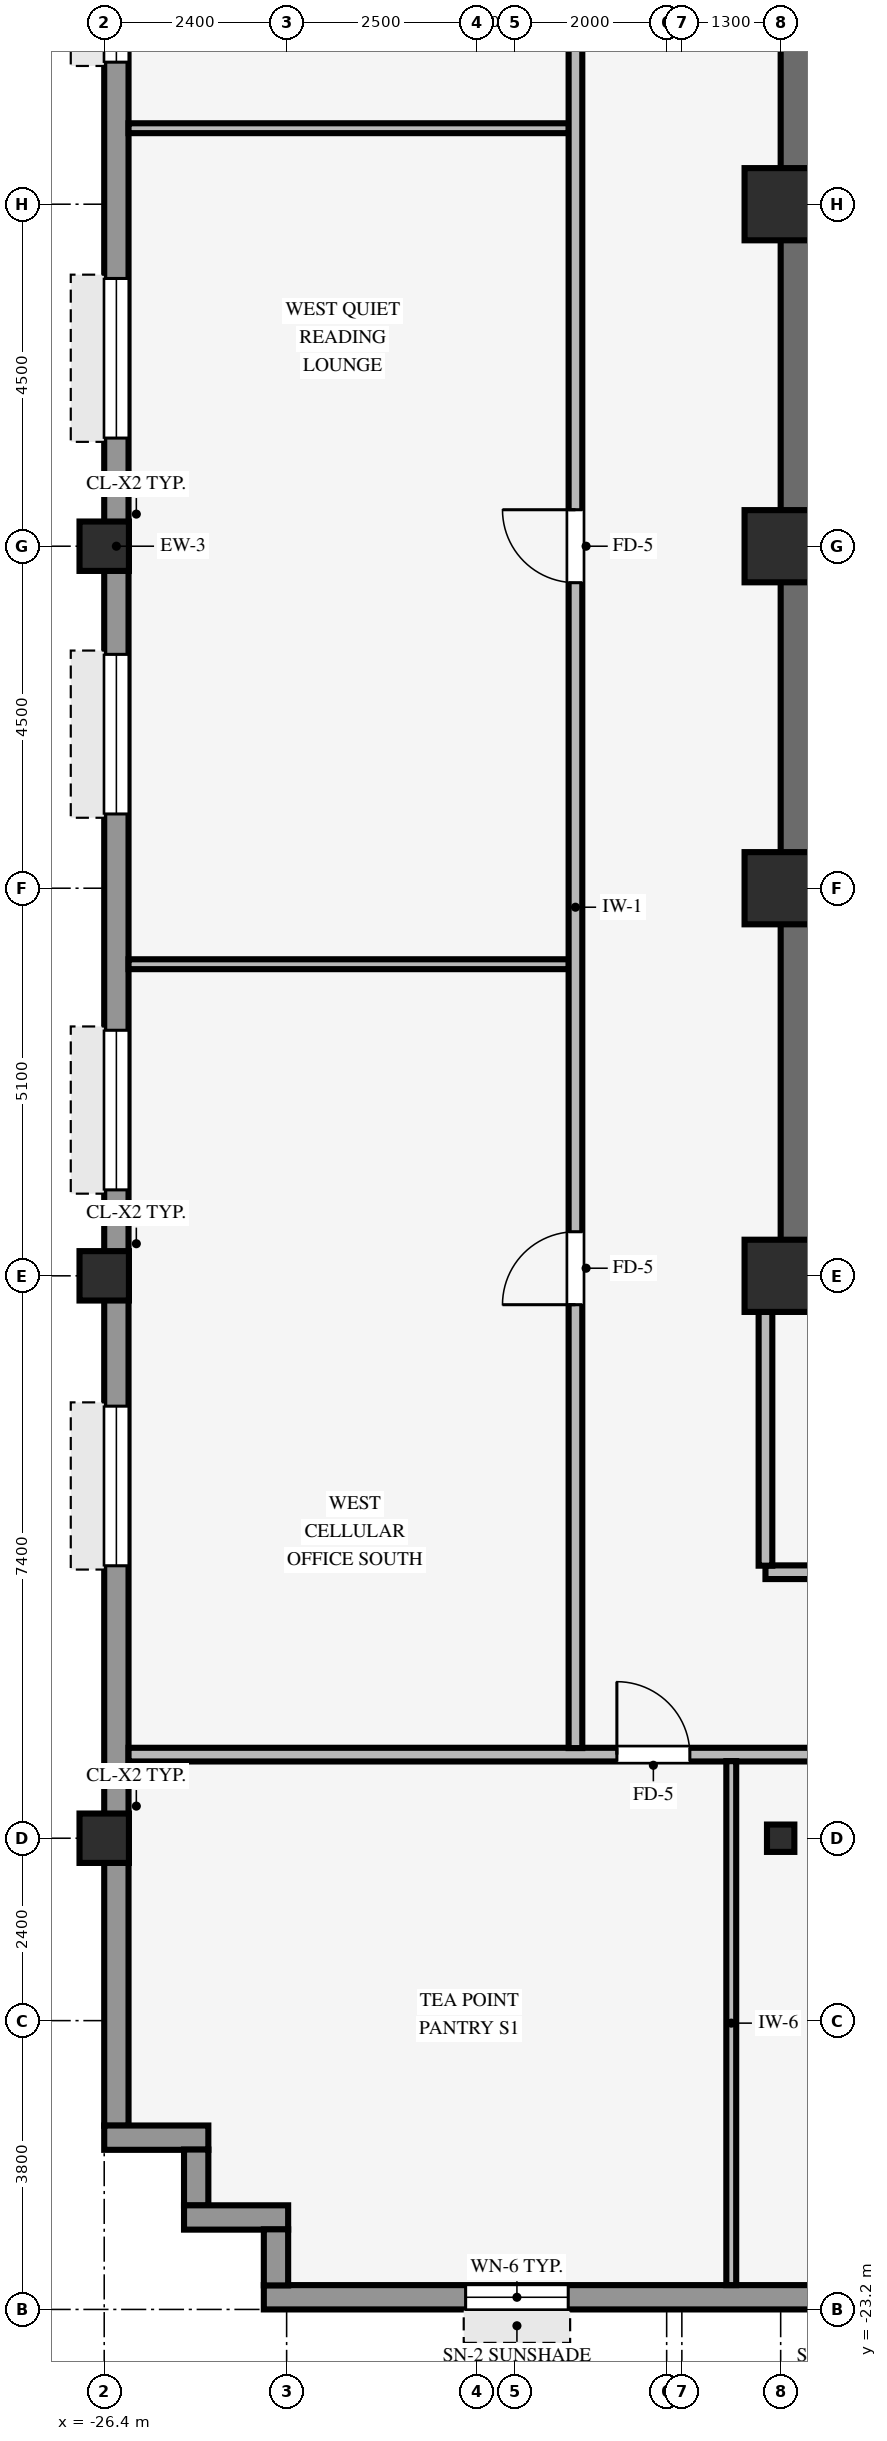
"""IFC4 building model, lengths in metres.
Left out: names, types, materials, properties, quantities, classifications, styles, units other than length and angle.
Written with IfcOpenShell. Run it as: python <this file> out.ifc"""

import sys

from ifc_helpers import new_model, si_unit, direction, frame, frame_2d, origin, origin_2d, place, context, subcontext, project, spatial, rectangle, hollow_rectangle, i_section, extrude, source, transform, mapped, element, fill, save


model = new_model("IFC4")
c1 = context("Model", 3, precision=1e-05, world=origin(), true_north=direction((0.0, 1.0)))
c2 = subcontext(c1, "Body", "Model", "MODEL_VIEW")
j1 = project(units=[si_unit("LENGTHUNIT", "METRE"), si_unit("PLANEANGLEUNIT", "RADIAN")], contexts=[c1])
p1 = place(None, origin())
s1 = spatial("IfcSite", under=j1, at=p1, CompositionType="ELEMENT")
p2 = place(p1, origin())
s2 = spatial("IfcBuilding", under=s1, at=p2, CompositionType="ELEMENT")
p3 = place(p2, frame((0.0, 0.0, 153.05)))
s3 = spatial("IfcBuildingStorey", under=s2, at=p3, CompositionType="ELEMENT", Elevation=153.05)
p4 = place(p3, frame((-17.5, -9.4, 0.0), z_axis=(0.0, 0.0, 1.0), x_axis=(1.0, 0.0, 0.0)))
e1 = element("IfcWall", 1, at=p4, inside=s3, PredefinedType="SHEAR", context=c2, shape_type="SweptSolid", body=[
    extrude(rectangle(XDim=8.5, YDim=0.4, at=frame_2d((4.25, 0.0))), origin(), (0.0, 0.0, 1.0), 3.37),
])
p5 = place(p3, frame((-17.3, -9.205, 0.0), z_axis=(0.0, 0.0, 1.0), x_axis=(0.0, 1.0, 0.0)))
e2 = element("IfcWall", 2, at=p5, inside=s3, PredefinedType="SHEAR", context=c2, shape_type="SweptSolid", body=[
    extrude(rectangle(XDim=18.41, YDim=0.4, at=frame_2d((9.205, 0.0))), origin(), (0.0, 0.0, 1.0), 3.37),
])
for number, where, z_axis, x_axis in (
    (3, (-17.5, -9.6, 0.0), (0.0, 0.0, 1.0), (1.0, 0.0, 0.0)),
    (4, (-17.5, -4.5, 0.0), (0.0, 0.0, 1.0), (1.0, 0.0, 0.0)),
    (5, (-17.5, 4.5, 0.0), (0.0, 0.0, 1.0), (1.0, 0.0, 0.0)),
    (6, (-17.5, 0.0, 0.0), (0.0, 0.0, 1.0), (1.0, 0.0, 0.0)),
):
    element("IfcColumn", number, at=place(p3, frame(where, z_axis=z_axis, x_axis=x_axis)), inside=s3, PredefinedType="COLUMN", context=c2, shape_type="SweptSolid", body=[
        extrude(rectangle(XDim=0.95, YDim=0.95, at=origin_2d()), origin(), (0.0, 0.0, 1.0), 3.37),
    ])
for number, where, z_axis, x_axis in (
    (7, (-26.4, -17.0, 0.0), (0.0, 0.0, 1.0), (1.0, 0.0, 0.0)),
    (8, (-26.4, -9.6, 0.0), (0.0, 0.0, 1.0), (1.0, 0.0, 0.0)),
    (9, (-26.4, 0.0, 0.0), (0.0, 0.0, 1.0), (1.0, 0.0, 0.0)),
):
    element("IfcColumn", number, at=place(p3, frame(where, z_axis=z_axis, x_axis=x_axis)), inside=s3, PredefinedType="COLUMN", context=c2, shape_type="SweptSolid", body=[
        extrude(hollow_rectangle(XDim=0.65, YDim=0.65, WallThickness=0.04, InnerFilletRadius=0.04, OuterFilletRadius=0.08, at=origin_2d()), origin(), (0.0, 0.0, 1.0), 3.37),
    ])
p6 = place(p3, frame((-17.5, -17.0, 0.0), z_axis=(0.0, 0.0, 1.0), x_axis=(1.0, 0.0, 0.0)))
e10 = element("IfcColumn", 10, at=p6, inside=s3, PredefinedType="COLUMN", context=c2, shape_type="SweptSolid", body=[
    extrude(i_section(OverallWidth=0.36, OverallDepth=0.36, WebThickness=0.021, FlangeThickness=0.021, FilletRadius=0.018, at=origin_2d()), origin(), (0.0, 0.0, 1.0), 3.37),
])
p7 = place(p3, frame((-24.3, -23.04, 0.0), z_axis=(0.0, 0.0, 1.0), x_axis=(1.0, 0.0, 0.0)))
e11 = element("IfcWall", 11, at=p7, inside=s3, PredefinedType="STANDARD", context=c2, shape_type="SweptSolid", body=[
    extrude(rectangle(XDim=48.6, YDim=0.32, at=frame_2d((24.3, 0.0))), origin(), (0.0, 0.0, 1.0), 2.705),
])
p8 = place(p7, frame((19.95, 0.0, 0.0), z_axis=(0.0, 0.0, 1.0), x_axis=(-1.0, 0.0, 0.0)))
e12 = element("IfcOpeningElement", 12, at=p8, cuts=e11, PredefinedType="OPENING", context=c2, shape_type="SweptSolid", body=[
    extrude(rectangle(XDim=1.05, YDim=2.1, at=frame_2d((0.525, 1.05))), frame((0.0, 0.17, 0.0), z_axis=(0.0, -1.0, 0.0), x_axis=(1.0, 0.0, 0.0)), (0.0, 0.0, 1.0), 0.34),
])
p9 = place(p7, frame((2.655, 0.0, 0.8)))
e13 = element("IfcOpeningElement", 13, at=p9, cuts=e11, PredefinedType="OPENING", context=c2, shape_type="SweptSolid", body=[
    extrude(rectangle(XDim=1.35, YDim=1.56, at=frame_2d((0.675, 0.78))), frame((0.0, 0.17, 0.0), z_axis=(0.0, -1.0, 0.0), x_axis=(1.0, 0.0, 0.0)), (0.0, 0.0, 1.0), 0.34),
])
p10 = place(p7, frame((7.315, 0.0, 0.8)))
e14 = element("IfcOpeningElement", 14, at=p10, cuts=e11, PredefinedType="OPENING", context=c2, shape_type="SweptSolid", body=[
    extrude(rectangle(XDim=1.35, YDim=1.56, at=frame_2d((0.675, 0.78))), frame((0.0, 0.17, 0.0), z_axis=(0.0, -1.0, 0.0), x_axis=(1.0, 0.0, 0.0)), (0.0, 0.0, 1.0), 0.34),
])
p11 = place(p7, frame((11.975, 0.0, 0.8)))
e15 = element("IfcOpeningElement", 15, at=p11, cuts=e11, PredefinedType="OPENING", context=c2, shape_type="SweptSolid", body=[
    extrude(rectangle(XDim=1.35, YDim=1.56, at=frame_2d((0.675, 0.78))), frame((0.0, 0.17, 0.0), z_axis=(0.0, -1.0, 0.0), x_axis=(1.0, 0.0, 0.0)), (0.0, 0.0, 1.0), 0.34),
])
p12 = place(p7, frame((21.295, 0.0, 0.8)))
e16 = element("IfcOpeningElement", 16, at=p12, cuts=e11, PredefinedType="OPENING", context=c2, shape_type="SweptSolid", body=[
    extrude(rectangle(XDim=1.35, YDim=1.56, at=frame_2d((0.675, 0.78))), frame((0.0, 0.17, 0.0), z_axis=(0.0, -1.0, 0.0), x_axis=(1.0, 0.0, 0.0)), (0.0, 0.0, 1.0), 0.34),
])
p13 = place(p7, frame((25.955, 0.0, 0.8)))
e17 = element("IfcOpeningElement", 17, at=p13, cuts=e11, PredefinedType="OPENING", context=c2, shape_type="SweptSolid", body=[
    extrude(rectangle(XDim=1.35, YDim=1.56, at=frame_2d((0.675, 0.78))), frame((0.0, 0.17, 0.0), z_axis=(0.0, -1.0, 0.0), x_axis=(1.0, 0.0, 0.0)), (0.0, 0.0, 1.0), 0.34),
])
p14 = place(p7, frame((31.065, 0.0, 0.8)))
e18 = element("IfcOpeningElement", 18, at=p14, cuts=e11, PredefinedType="OPENING", context=c2, shape_type="SweptSolid", body=[
    extrude(rectangle(XDim=1.35, YDim=1.56, at=frame_2d((0.675, 0.78))), frame((0.0, 0.17, 0.0), z_axis=(0.0, -1.0, 0.0), x_axis=(1.0, 0.0, 0.0)), (0.0, 0.0, 1.0), 0.34),
])
p15 = place(p7, frame((35.275, 0.0, 0.8)))
e19 = element("IfcOpeningElement", 19, at=p15, cuts=e11, PredefinedType="OPENING", context=c2, shape_type="SweptSolid", body=[
    extrude(rectangle(XDim=1.35, YDim=1.56, at=frame_2d((0.675, 0.78))), frame((0.0, 0.17, 0.0), z_axis=(0.0, -1.0, 0.0), x_axis=(1.0, 0.0, 0.0)), (0.0, 0.0, 1.0), 0.34),
])
p16 = place(p7, frame((39.935, 0.0, 0.8)))
e20 = element("IfcOpeningElement", 20, at=p16, cuts=e11, PredefinedType="OPENING", context=c2, shape_type="SweptSolid", body=[
    extrude(rectangle(XDim=1.35, YDim=1.56, at=frame_2d((0.675, 0.78))), frame((0.0, 0.17, 0.0), z_axis=(0.0, -1.0, 0.0), x_axis=(1.0, 0.0, 0.0)), (0.0, 0.0, 1.0), 0.34),
])
p17 = place(p7, frame((44.595, 0.0, 0.8)))
e21 = element("IfcOpeningElement", 21, at=p17, cuts=e11, PredefinedType="OPENING", context=c2, shape_type="SweptSolid", body=[
    extrude(rectangle(XDim=1.35, YDim=1.56, at=frame_2d((0.675, 0.78))), frame((0.0, 0.17, 0.0), z_axis=(0.0, -1.0, 0.0), x_axis=(1.0, 0.0, 0.0)), (0.0, 0.0, 1.0), 0.34),
])
p18 = place(p3, frame((-26.24, -20.784, 0.0), z_axis=(0.0, 0.0, 1.0), x_axis=(0.0, 1.0, 0.0)))
e22 = element("IfcWall", 22, at=p18, inside=s3, PredefinedType="STANDARD", context=c2, shape_type="SweptSolid", body=[
    extrude(rectangle(XDim=41.568, YDim=0.32, at=frame_2d((20.784, 0.0))), origin(), (0.0, 0.0, 1.0), 2.705),
])
p19 = place(p18, frame((7.369, 0.0, 0.8)))
e23 = element("IfcOpeningElement", 23, at=p19, cuts=e22, PredefinedType="OPENING", context=c2, shape_type="SweptSolid", body=[
    extrude(rectangle(XDim=2.1, YDim=1.56, at=frame_2d((1.05, 0.78))), frame((0.0, 0.17, 0.0), z_axis=(0.0, -1.0, 0.0), x_axis=(1.0, 0.0, 0.0)), (0.0, 0.0, 1.0), 0.34),
])
p20 = place(p18, frame((12.315, 0.0, 0.8)))
e24 = element("IfcOpeningElement", 24, at=p20, cuts=e22, PredefinedType="OPENING", context=c2, shape_type="SweptSolid", body=[
    extrude(rectangle(XDim=2.1, YDim=1.56, at=frame_2d((1.05, 0.78))), frame((0.0, 0.17, 0.0), z_axis=(0.0, -1.0, 0.0), x_axis=(1.0, 0.0, 0.0)), (0.0, 0.0, 1.0), 0.34),
])
p21 = place(p18, frame((17.261, 0.0, 0.8)))
e25 = element("IfcOpeningElement", 25, at=p21, cuts=e22, PredefinedType="OPENING", context=c2, shape_type="SweptSolid", body=[
    extrude(rectangle(XDim=2.1, YDim=1.56, at=frame_2d((1.05, 0.78))), frame((0.0, 0.17, 0.0), z_axis=(0.0, -1.0, 0.0), x_axis=(1.0, 0.0, 0.0)), (0.0, 0.0, 1.0), 0.34),
])
p22 = place(p18, frame((22.207, 0.0, 0.8)))
e26 = element("IfcOpeningElement", 26, at=p22, cuts=e22, PredefinedType="OPENING", context=c2, shape_type="SweptSolid", body=[
    extrude(rectangle(XDim=2.1, YDim=1.56, at=frame_2d((1.05, 0.78))), frame((0.0, 0.17, 0.0), z_axis=(0.0, -1.0, 0.0), x_axis=(1.0, 0.0, 0.0)), (0.0, 0.0, 1.0), 0.34),
])
p23 = place(p18, frame((27.153, 0.0, 0.8)))
e27 = element("IfcOpeningElement", 27, at=p23, cuts=e22, PredefinedType="OPENING", context=c2, shape_type="SweptSolid", body=[
    extrude(rectangle(XDim=2.1, YDim=1.56, at=frame_2d((1.05, 0.78))), frame((0.0, 0.17, 0.0), z_axis=(0.0, -1.0, 0.0), x_axis=(1.0, 0.0, 0.0)), (0.0, 0.0, 1.0), 0.34),
])
p24 = place(p18, frame((32.099, 0.0, 0.8)))
e28 = element("IfcOpeningElement", 28, at=p24, cuts=e22, PredefinedType="OPENING", context=c2, shape_type="SweptSolid", body=[
    extrude(rectangle(XDim=2.1, YDim=1.56, at=frame_2d((1.05, 0.78))), frame((0.0, 0.17, 0.0), z_axis=(0.0, -1.0, 0.0), x_axis=(1.0, 0.0, 0.0)), (0.0, 0.0, 1.0), 0.34),
])
p25 = place(p3, frame((-26.4, -20.94, 0.0), z_axis=(0.0, 0.0, 1.0), x_axis=(1.0, 0.0, 0.0)))
e29 = element("IfcWall", 29, at=p25, inside=s3, PredefinedType="STANDARD", context=c2, shape_type="SweptSolid", body=[
    extrude(rectangle(XDim=1.37, YDim=0.32, at=frame_2d((0.685, 0.0))), origin(), (0.0, 0.0, 1.0), 3.36),
])
p26 = place(p3, frame((-25.19, -21.834, 0.0), z_axis=(0.0, 0.0, 1.0), x_axis=(0.0, 1.0, 0.0)))
e30 = element("IfcWall", 30, at=p26, inside=s3, PredefinedType="STANDARD", context=c2, shape_type="SweptSolid", body=[
    extrude(rectangle(XDim=0.738, YDim=0.32, at=frame_2d((0.369, 0.0))), origin(), (0.0, 0.0, 1.0), 3.36),
])
p27 = place(p3, frame((-25.35, -21.99, 0.0), z_axis=(0.0, 0.0, 1.0), x_axis=(1.0, 0.0, 0.0)))
e31 = element("IfcWall", 31, at=p27, inside=s3, PredefinedType="STANDARD", context=c2, shape_type="SweptSolid", body=[
    extrude(rectangle(XDim=1.37, YDim=0.32, at=frame_2d((0.685, 0.0))), origin(), (0.0, 0.0, 1.0), 3.36),
])
p28 = place(p3, frame((-24.14, -22.884, 0.0), z_axis=(0.0, 0.0, 1.0), x_axis=(0.0, 1.0, 0.0)))
e32 = element("IfcWall", 32, at=p28, inside=s3, PredefinedType="STANDARD", context=c2, shape_type="SweptSolid", body=[
    extrude(rectangle(XDim=0.738, YDim=0.32, at=frame_2d((0.369, 0.0))), origin(), (0.0, 0.0, 1.0), 3.36),
])
p29 = place(p3, frame((-26.08, -15.9, 0.0), z_axis=(0.0, 0.0, 1.0), x_axis=(1.0, 0.0, 0.0)))
e33 = element("IfcWall", 33, at=p29, inside=s3, PredefinedType="PARTITIONING", context=c2, shape_type="SweptSolid", body=[
    extrude(rectangle(XDim=52.16, YDim=0.18, at=frame_2d((26.08, 0.0))), origin(), (0.0, 0.0, 1.0), 3.36),
])
p30 = place(p29, frame((24.5, 0.0, 0.0)))
e34 = element("IfcOpeningElement", 34, at=p30, cuts=e33, PredefinedType="OPENING", context=c2, shape_type="SweptSolid", body=[
    extrude(rectangle(XDim=0.96, YDim=2.1, at=frame_2d((0.48, 1.05))), frame((0.0, 0.1, 0.0), z_axis=(0.0, -1.0, 0.0), x_axis=(1.0, 0.0, 0.0)), (0.0, 0.0, 1.0), 0.2),
])
p31 = place(p29, frame((40.5, 0.0, 0.0)))
e35 = element("IfcOpeningElement", 35, at=p31, cuts=e33, PredefinedType="OPENING", context=c2, shape_type="SweptSolid", body=[
    extrude(rectangle(XDim=0.96, YDim=2.1, at=frame_2d((0.48, 1.05))), frame((0.0, 0.1, 0.0), z_axis=(0.0, -1.0, 0.0), x_axis=(1.0, 0.0, 0.0)), (0.0, 0.0, 1.0), 0.2),
])
p32 = place(p29, frame((13.16, 0.0, 0.0)))
e36 = element("IfcOpeningElement", 36, at=p32, cuts=e33, PredefinedType="OPENING", context=c2, shape_type="SweptSolid", body=[
    extrude(rectangle(XDim=0.96, YDim=2.1, at=frame_2d((0.48, 1.05))), frame((0.0, 0.1, 0.0), z_axis=(0.0, -1.0, 0.0), x_axis=(1.0, 0.0, 0.0)), (0.0, 0.0, 1.0), 0.2),
])
p33 = place(p29, frame((6.425, 0.0, 0.0)))
e37 = element("IfcOpeningElement", 37, at=p33, cuts=e33, PredefinedType="OPENING", context=c2, shape_type="SweptSolid", body=[
    extrude(rectangle(XDim=0.96, YDim=2.1, at=frame_2d((0.48, 1.05))), frame((0.0, 0.1, 0.0), z_axis=(0.0, -1.0, 0.0), x_axis=(1.0, 0.0, 0.0)), (0.0, 0.0, 1.0), 0.2),
])
p34 = place(p3, frame((-17.7, -13.5, 0.0), z_axis=(0.0, 0.0, 1.0), x_axis=(1.0, 0.0, 0.0)))
e38 = element("IfcWall", 38, at=p34, inside=s3, PredefinedType="PARTITIONING", context=c2, shape_type="SweptSolid", body=[
    extrude(rectangle(XDim=24.3, YDim=0.18, at=frame_2d((12.15, 0.0))), origin(), (0.0, 0.0, 1.0), 2.998),
])
p35 = place(p34, frame((5.47, 0.0, 0.0)))
e39 = element("IfcOpeningElement", 39, at=p35, cuts=e38, PredefinedType="OPENING", context=c2, shape_type="SweptSolid", body=[
    extrude(rectangle(XDim=0.96, YDim=2.1, at=frame_2d((0.48, 1.05))), frame((0.0, 0.1, 0.0), z_axis=(0.0, -1.0, 0.0), x_axis=(1.0, 0.0, 0.0)), (0.0, 0.0, 1.0), 0.2),
])
p36 = place(p34, frame((14.62, 0.0, 0.0)))
e40 = element("IfcOpeningElement", 40, at=p36, cuts=e38, PredefinedType="OPENING", context=c2, shape_type="SweptSolid", body=[
    extrude(rectangle(XDim=0.96, YDim=2.1, at=frame_2d((0.48, 1.05))), frame((0.0, 0.1, 0.0), z_axis=(0.0, -1.0, 0.0), x_axis=(1.0, 0.0, 0.0)), (0.0, 0.0, 1.0), 0.2),
])
p37 = place(p34, frame((18.9, 0.0, 0.0)))
e41 = element("IfcOpeningElement", 41, at=p37, cuts=e38, PredefinedType="OPENING", context=c2, shape_type="SweptSolid", body=[
    extrude(rectangle(XDim=0.9, YDim=2.1, at=frame_2d((0.45, 1.05))), frame((0.0, 0.1, 0.0), z_axis=(0.0, -1.0, 0.0), x_axis=(1.0, 0.0, 0.0)), (0.0, 0.0, 1.0), 0.2),
])
p38 = place(p34, frame((21.0, 0.0, 0.0)))
e42 = element("IfcOpeningElement", 42, at=p38, cuts=e38, PredefinedType="OPENING", context=c2, shape_type="SweptSolid", body=[
    extrude(rectangle(XDim=0.9, YDim=2.1, at=frame_2d((0.45, 1.05))), frame((0.0, 0.1, 0.0), z_axis=(0.0, -1.0, 0.0), x_axis=(1.0, 0.0, 0.0)), (0.0, 0.0, 1.0), 0.2),
])
for number, where, z_axis, x_axis in (
    (43, (-26.08, -5.5, 0.0), (0.0, 0.0, 1.0), (1.0, 0.0, 0.0)),
    (44, (-26.08, 5.5, 0.0), (0.0, 0.0, 1.0), (1.0, 0.0, 0.0)),
):
    element("IfcWall", number, at=place(p3, frame(where, z_axis=z_axis, x_axis=x_axis)), inside=s3, PredefinedType="PARTITIONING", context=c2, shape_type="SweptSolid", body=[
        extrude(rectangle(XDim=5.794, YDim=0.13, at=frame_2d((2.897, 0.0))), origin(), (0.0, 0.0, 1.0), 3.36),
    ])
p39 = place(p3, frame((-20.2, -15.814, 0.0), z_axis=(0.0, 0.0, 1.0), x_axis=(0.0, 1.0, 0.0)))
e45 = element("IfcWall", 45, at=p39, inside=s3, PredefinedType="PARTITIONING", context=c2, shape_type="SweptSolid", body=[
    extrude(rectangle(XDim=31.628, YDim=0.18, at=frame_2d((15.814, 0.0))), origin(), (0.0, 0.0, 1.0), 3.36),
])
p40 = place(p39, frame((15.334, 0.0, 0.0)))
e46 = element("IfcOpeningElement", 46, at=p40, cuts=e45, PredefinedType="OPENING", context=c2, shape_type="SweptSolid", body=[
    extrude(rectangle(XDim=0.96, YDim=2.1, at=frame_2d((0.48, 1.05))), frame((0.0, 0.1, 0.0), z_axis=(0.0, -1.0, 0.0), x_axis=(1.0, 0.0, 0.0)), (0.0, 0.0, 1.0), 0.2),
])
p41 = place(p39, frame((5.834, 0.0, 0.0)))
e47 = element("IfcOpeningElement", 47, at=p41, cuts=e45, PredefinedType="OPENING", context=c2, shape_type="SweptSolid", body=[
    extrude(rectangle(XDim=0.96, YDim=2.1, at=frame_2d((0.48, 1.05))), frame((0.0, 0.1, 0.0), z_axis=(0.0, -1.0, 0.0), x_axis=(1.0, 0.0, 0.0)), (0.0, 0.0, 1.0), 0.2),
])
p42 = place(p39, frame((24.834, 0.0, 0.0)))
e48 = element("IfcOpeningElement", 48, at=p42, cuts=e45, PredefinedType="OPENING", context=c2, shape_type="SweptSolid", body=[
    extrude(rectangle(XDim=0.96, YDim=2.1, at=frame_2d((0.48, 1.05))), frame((0.0, 0.1, 0.0), z_axis=(0.0, -1.0, 0.0), x_axis=(1.0, 0.0, 0.0)), (0.0, 0.0, 1.0), 0.2),
])
p43 = place(p3, frame((-18.15, -22.88, 0.0), z_axis=(0.0, 0.0, 1.0), x_axis=(0.0, 1.0, 0.0)))
e49 = element("IfcWall", 49, at=p43, inside=s3, PredefinedType="PARTITIONING", context=c2, shape_type="SweptSolid", body=[
    extrude(rectangle(XDim=6.894, YDim=0.13, at=frame_2d((3.447, 0.0))), origin(), (0.0, 0.0, 1.0), 3.36),
])
p44 = place(p3, frame((-17.7, -13.414, 0.0), z_axis=(0.0, 0.0, 1.0), x_axis=(0.0, 1.0, 0.0)))
e50 = element("IfcWall", 50, at=p44, inside=s3, PredefinedType="PARTITIONING", context=c2, shape_type="SweptSolid", body=[
    extrude(rectangle(XDim=3.343, YDim=0.18, at=frame_2d((1.671, 0.0))), origin(), (0.0, 0.0, 1.0), 2.816),
])
m1 = source(origin(), c2, "Body", "SweptSolid", [
    extrude(rectangle(XDim=1.35, YDim=1.56, at=frame_2d((0.675, 0.78))), frame((0.0, 0.03, 0.0), z_axis=(0.0, -1.0, 0.0), x_axis=(1.0, 0.0, 0.0)), (0.0, 0.0, 1.0), 0.06),
])
p45 = place(p9, origin())
e51 = element("IfcWindow", 51, at=p45, inside=s3, PartitioningType="SINGLE_PANEL", PredefinedType="WINDOW", context=c2, shape_type="MappedRepresentation", body=[
    mapped(m1, transform((0.0, 0.0, 0.0), scale=1.0)),
])
fill(e13, e51)
m2 = source(origin(), c2, "Body", "SweptSolid", [
    extrude(rectangle(XDim=2.1, YDim=1.56, at=frame_2d((1.05, 0.78))), frame((0.0, 0.03, 0.0), z_axis=(0.0, -1.0, 0.0), x_axis=(1.0, 0.0, 0.0)), (0.0, 0.0, 1.0), 0.06),
])
p46 = place(p19, origin())
e52 = element("IfcWindow", 52, at=p46, inside=s3, PartitioningType="SINGLE_PANEL", PredefinedType="WINDOW", context=c2, shape_type="MappedRepresentation", body=[
    mapped(m2, transform((0.0, 0.0, 0.0), scale=1.0)),
])
fill(e23, e52)
p47 = place(p20, origin())
e53 = element("IfcWindow", 53, at=p47, inside=s3, PartitioningType="SINGLE_PANEL", PredefinedType="WINDOW", context=c2, shape_type="MappedRepresentation", body=[
    mapped(m2, transform((0.0, 0.0, 0.0), scale=1.0)),
])
fill(e24, e53)
p48 = place(p21, origin())
e54 = element("IfcWindow", 54, at=p48, inside=s3, PartitioningType="SINGLE_PANEL", PredefinedType="WINDOW", context=c2, shape_type="MappedRepresentation", body=[
    mapped(m2, transform((0.0, 0.0, 0.0), scale=1.0)),
])
fill(e25, e54)
p49 = place(p22, origin())
e55 = element("IfcWindow", 55, at=p49, inside=s3, PartitioningType="SINGLE_PANEL", PredefinedType="WINDOW", context=c2, shape_type="MappedRepresentation", body=[
    mapped(m2, transform((0.0, 0.0, 0.0), scale=1.0)),
])
fill(e26, e55)
p50 = place(p23, origin())
e56 = element("IfcWindow", 56, at=p50, inside=s3, PartitioningType="SINGLE_PANEL", PredefinedType="WINDOW", context=c2, shape_type="MappedRepresentation", body=[
    mapped(m2, transform((0.0, 0.0, 0.0), scale=1.0)),
])
fill(e27, e56)
m3 = source(origin(), c2, "Body", "SweptSolid", [
    extrude(rectangle(XDim=0.96, YDim=2.1, at=frame_2d((0.48, 1.05))), frame((0.0, 0.025, 0.0), z_axis=(0.0, -1.0, 0.0), x_axis=(1.0, 0.0, 0.0)), (0.0, 0.0, 1.0), 0.05),
])
p51 = place(p40, origin())
e57 = element("IfcDoor", 57, at=p51, inside=s3, OperationType="SINGLE_SWING_RIGHT", PredefinedType="DOOR", context=c2, shape_type="MappedRepresentation", body=[
    mapped(m3, transform((0.0, 0.0, 0.0), scale=1.0)),
])
fill(e46, e57)
p52 = place(p41, origin())
e58 = element("IfcDoor", 58, at=p52, inside=s3, OperationType="SINGLE_SWING_LEFT", PredefinedType="DOOR", context=c2, shape_type="MappedRepresentation", body=[
    mapped(m3, transform((0.0, 0.0, 0.0), scale=1.0)),
])
fill(e47, e58)
p53 = place(p33, origin())
e59 = element("IfcDoor", 59, at=p53, inside=s3, OperationType="SINGLE_SWING_LEFT", PredefinedType="DOOR", context=c2, shape_type="MappedRepresentation", body=[
    mapped(m3, transform((0.0, 0.0, 0.0), scale=1.0)),
])
fill(e37, e59)
save(model, sys.argv[1])
